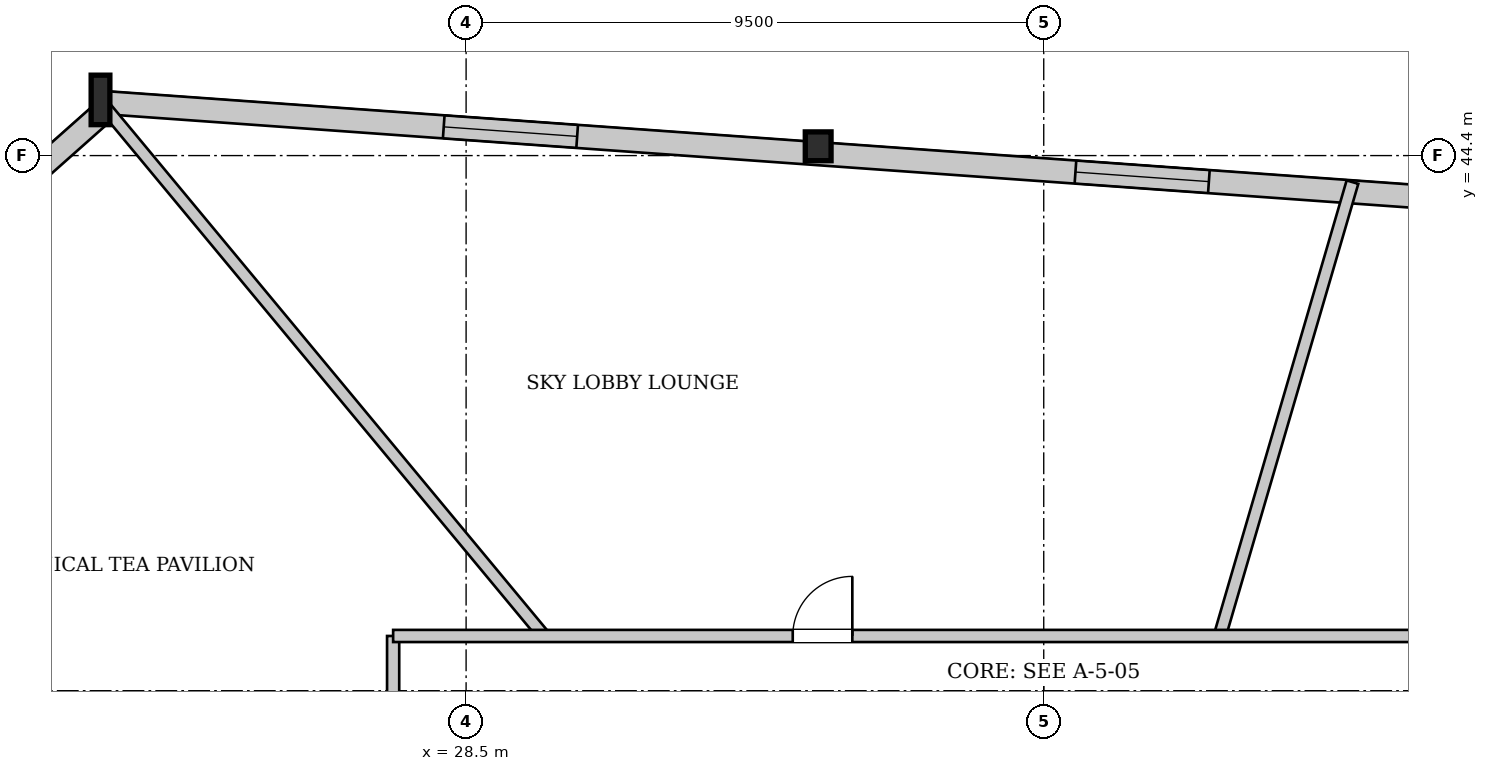
"""IFC4 building model, lengths in metres.
Left out: names, types, materials, properties, quantities, classifications, styles, units other than length and angle.
Written with IfcOpenShell. Run it as: python <this file> out.ifc"""

import sys

from ifc_helpers import new_model, si_unit, direction, frame, frame_2d, origin, origin_2d, place, context, subcontext, project, spatial, rectangle, i_section, extrude, source, transform, mapped, element, fill, save


model = new_model("IFC4")
c1 = context("Model", 3, precision=1e-05, world=origin(), true_north=direction((0.0, 1.0)))
c2 = subcontext(c1, "Body", "Model", "MODEL_VIEW")
j1 = project(units=[si_unit("LENGTHUNIT", "METRE"), si_unit("PLANEANGLEUNIT", "RADIAN")], contexts=[c1])
p1 = place(None, origin())
s1 = spatial("IfcSite", under=j1, at=p1, CompositionType="ELEMENT")
p2 = place(p1, origin())
s2 = spatial("IfcBuilding", under=s1, at=p2, CompositionType="ELEMENT")
p3 = place(p2, frame((0.0, 0.0, 71.9)))
s3 = spatial("IfcBuildingStorey", under=s2, at=p3, CompositionType="ELEMENT", Elevation=71.9)
m1 = source(origin(), c2, "Body", "SweptSolid", [
    extrude(i_section(OverallWidth=0.424, OverallDepth=0.474, WebThickness=0.043, FlangeThickness=0.068, at=origin_2d()), origin(), (0.0, 0.0, 1.0), 3.848),
])
p4 = place(p3, frame((34.438, 44.612, 0.0), z_axis=(-0.07650994106, -0.03070548215, 0.996595907219), x_axis=(0.372451852462, -0.928051516672, 0.0)))
e1 = element("IfcColumn", 1, at=p4, inside=s3, PredefinedType="COLUMN", context=c2, shape_type="MappedRepresentation", body=[
    mapped(m1, transform((0.0, 0.0, 0.0), x_axis=(1.0, 0.0, 0.0), y_axis=(0.0, 1.0, 0.0), z_axis=(0.0, 0.0, 1.0), scale=1.0)),
])
m2 = source(origin(), c2, "Body", "SweptSolid", [
    extrude(i_section(OverallWidth=0.308, OverallDepth=0.814, WebThickness=0.021, FlangeThickness=0.04, at=origin_2d()), origin(), (0.0, 0.0, 1.0), 3.856),
])
p5 = place(p3, frame((22.632, 45.456, 0.0), z_axis=(-0.07483088436, -0.073058240738, 0.994516381065), x_axis=(0.698581004946, -0.715530977337, 0.0)))
e2 = element("IfcColumn", 2, at=p5, inside=s3, PredefinedType="COLUMN", context=c2, shape_type="MappedRepresentation", body=[
    mapped(m2, transform((0.0, 0.0, 0.0), x_axis=(1.0, 0.0, 0.0), y_axis=(0.0, 1.0, 0.0), z_axis=(0.0, 0.0, 1.0), scale=1.0)),
])
p6 = place(p3, frame((18.236, 41.299, 0.0), z_axis=(0.0, 0.0, 1.0), x_axis=(0.747770050528, 0.663957793488, 0.0)))
e3 = element("IfcWall", 3, at=p6, inside=s3, PredefinedType="SOLIDWALL", context=c2, shape_type="SweptSolid", body=[
    extrude(rectangle(XDim=6.047, YDim=0.38, at=frame_2d((3.024, 0.0))), origin(), (0.0, 0.0, 1.0), 3.042),
])
p7 = place(p3, frame((22.618, 45.267, 0.0), z_axis=(0.0, 0.0, 1.0), x_axis=(0.997450631022, -0.071359923443, 0.0)))
e4 = element("IfcWall", 4, at=p7, inside=s3, PredefinedType="SOLIDWALL", context=c2, shape_type="SweptSolid", body=[
    extrude(rectangle(XDim=23.672, YDim=0.38, at=frame_2d((11.836, 0.0))), origin(), (0.0, 0.0, 1.0), 3.042),
])
p8 = place(p7, frame((5.528, 0.0, 0.65)))
e5 = element("IfcOpeningElement", 5, at=p8, cuts=e4, PredefinedType="OPENING", context=c2, shape_type="SweptSolid", body=[
    extrude(rectangle(XDim=2.2, YDim=2.25, at=frame_2d((1.1, 1.125))), frame((0.0, 0.2, 0.0), z_axis=(0.0, -1.0, 0.0), x_axis=(1.0, 0.0, 0.0)), (0.0, 0.0, 1.0), 0.4),
])
p9 = place(p7, frame((15.944, 0.0, 0.65)))
e6 = element("IfcOpeningElement", 6, at=p9, cuts=e4, PredefinedType="OPENING", context=c2, shape_type="SweptSolid", body=[
    extrude(rectangle(XDim=2.2, YDim=2.25, at=frame_2d((1.1, 1.125))), frame((0.0, 0.2, 0.0), z_axis=(0.0, -1.0, 0.0), x_axis=(1.0, 0.0, 0.0)), (0.0, 0.0, 1.0), 0.4),
])
p10 = place(p3, frame((40.895, 36.5, 0.0), z_axis=(0.0, 0.0, 1.0), x_axis=(0.280658217251, 0.959807775072, 0.0)))
e7 = element("IfcWall", 7, at=p10, inside=s3, PredefinedType="PARTITIONING", context=c2, shape_type="SweptSolid", body=[
    extrude(rectangle(XDim=7.776, YDim=0.2, at=frame_2d((3.888, 0.0))), origin(), (0.0, 0.0, 1.0), 3.75),
])
p11 = place(p3, frame((29.781, 36.5, 0.0), z_axis=(0.0, 0.0, 1.0), x_axis=(-0.638776626614, 0.769392241507, 0.0)))
e8 = element("IfcWall", 8, at=p11, inside=s3, PredefinedType="PARTITIONING", context=c2, shape_type="SweptSolid", body=[
    extrude(rectangle(XDim=11.42, YDim=0.2, at=frame_2d((5.71, 0.0))), origin(), (0.0, 0.0, 1.0), 3.245),
])
p12 = place(p3, frame((27.3, 16.7, 0.0), z_axis=(0.0, 0.0, 1.0), x_axis=(0.0, 1.0, 0.0)))
e9 = element("IfcWall", 9, at=p12, inside=s3, PredefinedType="PARTITIONING", context=c2, shape_type="SweptSolid", body=[
    extrude(rectangle(XDim=19.8, YDim=0.2, at=frame_2d((9.9, 0.0))), origin(), (0.0, 0.0, 1.0), 3.75),
])
p13 = place(p12, frame((14.2, 0.0, 0.0)))
e10 = element("IfcOpeningElement", 10, at=p13, cuts=e9, PredefinedType="OPENING", context=c2, shape_type="SweptSolid", body=[
    extrude(rectangle(XDim=0.98, YDim=2.15, at=frame_2d((0.49, 1.075))), frame((0.0, 0.11, 0.0), z_axis=(0.0, -1.0, 0.0), x_axis=(1.0, 0.0, 0.0)), (0.0, 0.0, 1.0), 0.22),
])
p14 = place(p12, frame((0.3, 0.0, 0.0)))
e11 = element("IfcOpeningElement", 11, at=p14, cuts=e9, PredefinedType="OPENING", context=c2, shape_type="SweptSolid", body=[
    extrude(rectangle(XDim=0.98, YDim=2.15, at=frame_2d((0.49, 1.075))), frame((0.0, 0.11, 0.0), z_axis=(0.0, -1.0, 0.0), x_axis=(1.0, 0.0, 0.0)), (0.0, 0.0, 1.0), 0.22),
])
p15 = place(p3, frame((27.3, 36.5, 0.0), z_axis=(0.0, 0.0, 1.0), x_axis=(1.0, 0.0, 0.0)))
e12 = element("IfcWall", 12, at=p15, inside=s3, PredefinedType="PARTITIONING", context=c2, shape_type="SweptSolid", body=[
    extrude(rectangle(XDim=21.4, YDim=0.2, at=frame_2d((10.7, 0.0))), origin(), (0.0, 0.0, 1.0), 3.75),
])
p16 = place(p15, frame((19.5, 0.0, 0.0)))
e13 = element("IfcOpeningElement", 13, at=p16, cuts=e12, PredefinedType="OPENING", context=c2, shape_type="SweptSolid", body=[
    extrude(rectangle(XDim=1.6, YDim=2.2, at=frame_2d((0.8, 1.1))), frame((0.0, 0.11, 0.0), z_axis=(0.0, -1.0, 0.0), x_axis=(1.0, 0.0, 0.0)), (0.0, 0.0, 1.0), 0.22),
])
p17 = place(p15, frame((6.572, 0.0, 0.0)))
e14 = element("IfcOpeningElement", 14, at=p17, cuts=e12, PredefinedType="OPENING", context=c2, shape_type="SweptSolid", body=[
    extrude(rectangle(XDim=0.98, YDim=2.15, at=frame_2d((0.49, 1.075))), frame((0.0, 0.11, 0.0), z_axis=(0.0, -1.0, 0.0), x_axis=(1.0, 0.0, 0.0)), (0.0, 0.0, 1.0), 0.22),
])
m3 = source(origin(), c2, "Body", "SweptSolid", [
    extrude(rectangle(XDim=2.2, YDim=2.25, at=frame_2d((1.1, 1.125))), frame((0.0, 0.03, 0.0), z_axis=(0.0, -1.0, 0.0), x_axis=(1.0, 0.0, 0.0)), (0.0, 0.0, 1.0), 0.06),
])
p18 = place(p8, origin())
e15 = element("IfcWindow", 15, at=p18, inside=s3, PartitioningType="SINGLE_PANEL", PredefinedType="WINDOW", context=c2, shape_type="MappedRepresentation", body=[
    mapped(m3, transform((0.0, 0.0, 0.0), x_axis=(1.0, 0.0, 0.0), y_axis=(0.0, 1.0, 0.0), z_axis=(0.0, 0.0, 1.0), scale=1.0)),
])
fill(e5, e15)
p19 = place(p9, origin())
e16 = element("IfcWindow", 16, at=p19, inside=s3, PartitioningType="SINGLE_PANEL", PredefinedType="WINDOW", context=c2, shape_type="MappedRepresentation", body=[
    mapped(m3, transform((0.0, 0.0, 0.0), x_axis=(1.0, 0.0, 0.0), y_axis=(0.0, 1.0, 0.0), z_axis=(0.0, 0.0, 1.0), scale=1.0)),
])
fill(e6, e16)
m4 = source(origin(), c2, "Body", "SweptSolid", [
    extrude(rectangle(XDim=0.98, YDim=2.15, at=frame_2d((0.49, 1.075))), frame((0.0, 0.025, 0.0), z_axis=(0.0, -1.0, 0.0), x_axis=(1.0, 0.0, 0.0)), (0.0, 0.0, 1.0), 0.05),
])
p20 = place(p17, origin())
e17 = element("IfcDoor", 17, at=p20, inside=s3, OperationType="SINGLE_SWING_RIGHT", PredefinedType="DOOR", context=c2, shape_type="MappedRepresentation", body=[
    mapped(m4, transform((0.0, 0.0, 0.0), x_axis=(1.0, 0.0, 0.0), y_axis=(0.0, 1.0, 0.0), z_axis=(0.0, 0.0, 1.0), scale=1.0)),
])
fill(e14, e17)
save(model, sys.argv[1])
